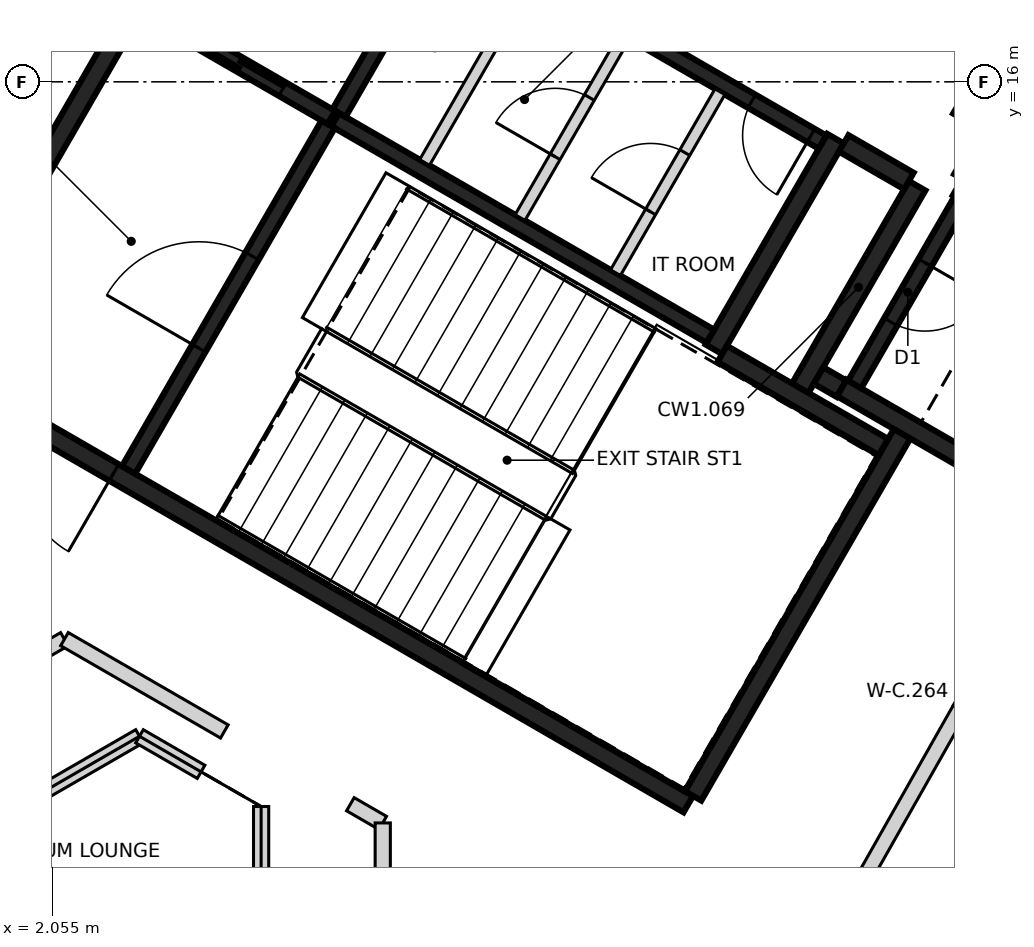
"""IFC4 building model, lengths in metres.
Left out: names, types, materials, properties, quantities, classifications, styles, units other than length and angle.
Written with IfcOpenShell. Run it as: python <this file> out.ifc"""

import sys

from ifc_helpers import new_model, si_unit, direction, frame, frame_2d, origin, place, context, subcontext, project, spatial, rectangle, extrude, element, fill, save


model = new_model("IFC4")
c1 = context("Model", 3, precision=1e-05, world=origin(), true_north=direction((0.0, 1.0)))
c2 = subcontext(c1, "Body", "Model", "MODEL_VIEW")
j1 = project(units=[si_unit("LENGTHUNIT", "METRE"), si_unit("PLANEANGLEUNIT", "RADIAN")], contexts=[c1])
p1 = place(None, origin())
s1 = spatial("IfcSite", under=j1, at=p1, CompositionType="ELEMENT")
p2 = place(p1, origin())
s2 = spatial("IfcBuilding", under=s1, at=p2, CompositionType="ELEMENT")
p3 = place(p2, frame((0.0, 0.0, 150.4)))
s3 = spatial("IfcBuildingStorey", under=s2, at=p3, CompositionType="ELEMENT", Elevation=150.4)
p4 = place(p3, frame((10.42, 6.498, 0.0), z_axis=(0.0, 0.0, 1.0), x_axis=(-0.866021906294, 0.500006057782, 0.0)))
e1 = element("IfcWall", 1, at=p4, inside=s3, PredefinedType="SHEAR", context=c2, shape_type="SweptSolid", body=[
    extrude(rectangle(XDim=11.55, YDim=0.25, at=frame_2d((5.775, 0.0))), origin(), (0.0, 0.0, 1.0), 3.2),
])
p5 = place(p4, frame((10.025, 0.0, 0.0)))
e2 = element("IfcOpeningElement", 2, at=p5, cuts=e1, PredefinedType="OPENING", context=c2, shape_type="SweptSolid", body=[
    extrude(rectangle(XDim=1.2, YDim=2.1, at=frame_2d((0.6, 1.05))), frame((0.0, 0.135, 0.0), z_axis=(0.0, -1.0, 0.0), x_axis=(1.0, 0.0, 0.0)), (0.0, 0.0, 1.0), 0.27),
])
p6 = place(p4, frame((8.725, 0.0, 0.0)))
e3 = element("IfcOpeningElement", 3, at=p6, cuts=e1, PredefinedType="OPENING", context=c2, shape_type="SweptSolid", body=[
    extrude(rectangle(XDim=1.2, YDim=2.1, at=frame_2d((0.6, 1.05))), frame((0.0, 0.135, 0.0), z_axis=(0.0, -1.0, 0.0), x_axis=(1.0, 0.0, 0.0)), (0.0, 0.0, 1.0), 0.27),
])
p7 = place(p3, frame((0.48, 12.381, 0.0), z_axis=(0.0, 0.0, 1.0), x_axis=(0.49999885962, 0.866026062182, 0.0)))
e4 = element("IfcWall", 4, at=p7, inside=s3, PredefinedType="SHEAR", context=c2, shape_type="SweptSolid", body=[
    extrude(rectangle(XDim=5.225, YDim=0.25, at=frame_2d((2.612, 0.0))), origin(), (0.0, 0.0, 1.0), 3.2),
])
p8 = place(p3, frame((13.238, 11.378, 0.0), z_axis=(0.0, 0.0, 1.0), x_axis=(-0.500008851346, -0.866020293397, 0.0)))
e5 = element("IfcWall", 5, at=p8, inside=s3, PredefinedType="SHEAR", context=c2, shape_type="SweptSolid", body=[
    extrude(rectangle(XDim=5.51, YDim=0.25, at=frame_2d((2.755, 0.0))), origin(), (0.0, 0.0, 1.0), 3.2),
])
p9 = place(p3, frame((12.357, 15.252, 0.0), z_axis=(0.0, 0.0, 1.0), x_axis=(-0.500028443584, -0.866008981251, 0.0)))
e6 = element("IfcWall", 6, at=p9, inside=s3, PredefinedType="SHEAR", context=c2, shape_type="SweptSolid", body=[
    extrude(rectangle(XDim=3.2, YDim=0.25, at=frame_2d((1.6, 0.0))), origin(), (0.0, 0.0, 1.0), 3.2),
])
p10 = place(p3, frame((14.918, 10.54, 0.0), z_axis=(0.0, 0.0, 1.0), x_axis=(-0.866063538972, 0.499933942099, 0.0)))
e7 = element("IfcWall", 7, at=p10, inside=s3, PredefinedType="SHEAR", context=c2, shape_type="SweptSolid", body=[
    extrude(rectangle(XDim=2.865, YDim=0.25, at=frame_2d((1.432, 0.0))), origin(), (0.0, 0.0, 1.0), 3.2),
])
p11 = place(p3, frame((13.963, 14.614, 0.0), z_axis=(0.0, 0.0, 1.0), x_axis=(0.866042235819, -0.499970844928, 0.0)))
e8 = element("IfcWall", 8, at=p11, inside=s3, PredefinedType="SHEAR", context=c2, shape_type="SweptSolid", body=[
    extrude(rectangle(XDim=2.865, YDim=0.25, at=frame_2d((1.432, 0.0))), origin(), (0.0, 0.0, 1.0), 3.2),
])
p12 = place(p3, frame((11.888, 11.961, 0.0), z_axis=(0.0, 0.0, 1.0), x_axis=(0.500003324108, 0.866023484601, 0.0)))
e9 = element("IfcWall", 9, at=p12, inside=s3, PredefinedType="SHEAR", context=c2, shape_type="SweptSolid", body=[
    extrude(rectangle(XDim=3.085, YDim=0.25, at=frame_2d((1.542, 0.0))), origin(), (0.0, 0.0, 1.0), 3.2),
])
p13 = place(p3, frame((10.865, 12.418, 0.0), z_axis=(0.0, 0.0, 1.0), x_axis=(0.866026229868, -0.499998569178, 0.0)))
e10 = element("IfcWall", 10, at=p13, inside=s3, PredefinedType="SHEAR", context=c2, shape_type="SweptSolid", body=[
    extrude(rectangle(XDim=2.449, YDim=0.25, at=frame_2d((1.225, 0.0))), origin(), (0.0, 0.0, 1.0), 3.2),
])
p14 = place(p3, frame((14.945, 17.135, 0.0), z_axis=(0.0, 0.0, 1.0), x_axis=(-0.499983108224, -0.866035156036, 0.0)))
e11 = element("IfcWall", 11, at=p14, inside=s3, PredefinedType="SHEAR", context=c2, shape_type="SweptSolid", body=[
    extrude(rectangle(XDim=1.865, YDim=0.25, at=frame_2d((0.932, 0.0))), origin(), (0.0, 0.0, 1.0), 3.2),
])
p15 = place(p14, frame((0.535, 0.0, 0.0)))
e12 = element("IfcOpeningElement", 12, at=p15, cuts=e11, PredefinedType="OPENING", context=c2, shape_type="SweptSolid", body=[
    extrude(rectangle(XDim=1.25, YDim=2.1, at=frame_2d((0.625, 1.05))), frame((0.0, 0.135, 0.0), z_axis=(0.0, -1.0, 0.0), x_axis=(1.0, 0.0, 0.0)), (0.0, 0.0, 1.0), 0.27),
])
p16 = place(p3, frame((13.322, 14.695, 0.0), z_axis=(0.0, 0.0, 1.0), x_axis=(-0.866017078145, 0.500014420154, 0.0)))
e13 = element("IfcWall", 13, at=p16, inside=s3, PredefinedType="SHEAR", context=c2, shape_type="SweptSolid", body=[
    extrude(rectangle(XDim=0.989, YDim=0.25, at=frame_2d((0.495, 0.0))), origin(), (0.0, 0.0, 1.0), 3.2),
])
p17 = place(p3, frame((14.368, 15.315, 0.0), z_axis=(0.0, 0.0, 1.0), x_axis=(-0.499897359611, -0.866084655132, 0.0)))
e14 = element("IfcWall", 14, at=p17, inside=s3, PredefinedType="SHEAR", context=c2, shape_type="SweptSolid", body=[
    extrude(rectangle(XDim=0.685, YDim=0.25, at=frame_2d((0.342, 0.0))), origin(), (0.0, 0.0, 1.0), 3.2),
])
p18 = place(p3, frame((12.433, 11.964, 0.0), z_axis=(0.0, 0.0, 1.0), x_axis=(-0.866055875208, 0.499947218231, 0.0)))
e15 = element("IfcWall", 15, at=p18, inside=s3, PredefinedType="SHEAR", context=c2, shape_type="SweptSolid", body=[
    extrude(rectangle(XDim=0.345, YDim=0.25, at=frame_2d((0.172, 0.0))), origin(), (0.0, 0.0, 1.0), 3.2),
])
p19 = place(p3, frame((5.775, 15.502, 0.0), z_axis=(0.0, 0.0, 1.0), x_axis=(0.866020080793, -0.500009219579, 0.0)))
e16 = element("IfcWall", 16, at=p19, inside=s3, PredefinedType="SHEAR", context=c2, shape_type="SweptSolid", body=[
    extrude(rectangle(XDim=5.699, YDim=0.2, at=frame_2d((2.85, 0.0))), origin(), (0.0, 0.0, 1.0), 3.2),
])
p20 = place(p3, frame((12.185, 15.207, 0.0), z_axis=(0.0, 0.0, 1.0), x_axis=(-0.866020080793, 0.500009219579, 0.0)))
e17 = element("IfcWall", 17, at=p20, inside=s3, PredefinedType="SHEAR", context=c2, shape_type="SweptSolid", body=[
    extrude(rectangle(XDim=5.699, YDim=0.2, at=frame_2d((2.85, 0.0))), origin(), (0.0, 0.0, 1.0), 3.2),
])
p21 = place(p20, frame((0.174, 0.0, 0.0)))
e18 = element("IfcOpeningElement", 18, at=p21, cuts=e17, PredefinedType="OPENING", context=c2, shape_type="SweptSolid", body=[
    extrude(rectangle(XDim=0.9, YDim=2.1, at=frame_2d((0.45, 1.05))), frame((0.0, 0.11, 0.0), z_axis=(0.0, -1.0, 0.0), x_axis=(1.0, 0.0, 0.0)), (0.0, 0.0, 1.0), 0.22),
])
p22 = place(p20, frame((4.599, 0.0, 0.0)))
e19 = element("IfcOpeningElement", 19, at=p22, cuts=e17, PredefinedType="OPENING", context=c2, shape_type="SweptSolid", body=[
    extrude(rectangle(XDim=0.9, YDim=2.1, at=frame_2d((0.45, 1.05))), frame((0.0, 0.11, 0.0), z_axis=(0.0, -1.0, 0.0), x_axis=(1.0, 0.0, 0.0)), (0.0, 0.0, 1.0), 0.22),
])
p23 = place(p3, frame((3.057, 10.895, 0.0), z_axis=(0.0, 0.0, 1.0), x_axis=(0.499989418164, 0.866031513124, 0.0)))
e20 = element("IfcWall", 20, at=p23, inside=s3, PredefinedType="SHEAR", context=c2, shape_type="SweptSolid", body=[
    extrude(rectangle(XDim=5.251, YDim=0.2, at=frame_2d((2.625, 0.0))), origin(), (0.0, 0.0, 1.0), 3.2),
])
p24 = place(p23, frame((1.849, 0.0, 0.0)))
e21 = element("IfcOpeningElement", 21, at=p24, cuts=e20, PredefinedType="OPENING", context=c2, shape_type="SweptSolid", body=[
    extrude(rectangle(XDim=1.4, YDim=2.1, at=frame_2d((0.7, 1.05))), frame((0.0, 0.11, 0.0), z_axis=(0.0, -1.0, 0.0), x_axis=(1.0, 0.0, 0.0)), (0.0, 0.0, 1.0), 0.22),
])
p25 = place(p3, frame((14.008, 14.442, 0.0), z_axis=(0.0, 0.0, 1.0), x_axis=(-0.499986818241, -0.866033014143, 0.0)))
e22 = element("IfcWall", 22, at=p25, inside=s3, PredefinedType="SHEAR", context=c2, shape_type="SweptSolid", body=[
    extrude(rectangle(XDim=2.798, YDim=0.2, at=frame_2d((1.399, 0.0))), origin(), (0.0, 0.0, 1.0), 3.2),
])
p26 = place(p25, frame((0.949, 0.0, 0.0)))
e23 = element("IfcOpeningElement", 23, at=p26, cuts=e22, PredefinedType="OPENING", context=c2, shape_type="SweptSolid", body=[
    extrude(rectangle(XDim=0.9, YDim=2.1, at=frame_2d((0.45, 1.05))), frame((0.0, 0.11, 0.0), z_axis=(0.0, -1.0, 0.0), x_axis=(1.0, 0.0, 0.0)), (0.0, 0.0, 1.0), 0.22),
])
p27 = place(p3, frame((7.199, 17.97, 0.0), z_axis=(0.0, 0.0, 1.0), x_axis=(-0.499968400327, -0.866043647095, 0.0)))
e24 = element("IfcWall", 24, at=p27, inside=s3, PredefinedType="SHEAR", context=c2, shape_type="SweptSolid", body=[
    extrude(rectangle(XDim=2.75, YDim=0.2, at=frame_2d((1.375, 0.0))), origin(), (0.0, 0.0, 1.0), 3.2),
])
p28 = place(p3, frame((5.725, 15.531, 0.0), z_axis=(0.0, 0.0, 1.0), x_axis=(-0.866037306777, 0.499979382845, 0.0)))
e25 = element("IfcWall", 25, at=p28, inside=s3, PredefinedType="SHEAR", context=c2, shape_type="SweptSolid", body=[
    extrude(rectangle(XDim=2.742, YDim=0.2, at=frame_2d((1.371, 0.0))), origin(), (0.0, 0.0, 1.0), 3.2),
])
p29 = place(p28, frame((0.743, 0.0, 0.0)))
e26 = element("IfcOpeningElement", 26, at=p29, cuts=e25, PredefinedType="OPENING", context=c2, shape_type="SweptSolid", body=[
    extrude(rectangle(XDim=1.3, YDim=2.1, at=frame_2d((0.65, 1.05))), frame((0.0, 0.11, 0.0), z_axis=(0.0, -1.0, 0.0), x_axis=(1.0, 0.0, 0.0)), (0.0, 0.0, 1.0), 0.22),
])
p30 = place(p3, frame((9.462, 13.489, 0.0), z_axis=(0.0, 0.0, 1.0), x_axis=(0.50002746344, 0.86600954718, 0.0)))
e27 = element("IfcWall", 27, at=p30, inside=s3, PredefinedType="PARTITIONING", context=c2, shape_type="SweptSolid", body=[
    extrude(rectangle(XDim=2.748, YDim=0.15, at=frame_2d((1.374, 0.0))), origin(), (0.0, 0.0, 1.0), 3.2),
])
p31 = place(p30, frame((0.924, 0.0, 0.0)))
e28 = element("IfcOpeningElement", 28, at=p31, cuts=e27, PredefinedType="OPENING", context=c2, shape_type="SweptSolid", body=[
    extrude(rectangle(XDim=0.9, YDim=2.1, at=frame_2d((0.45, 1.05))), frame((0.0, 0.085, 0.0), z_axis=(0.0, -1.0, 0.0), x_axis=(1.0, 0.0, 0.0)), (0.0, 0.0, 1.0), 0.17),
])
p32 = place(p3, frame((8.207, 14.214, 0.0), z_axis=(0.0, 0.0, 1.0), x_axis=(0.499922376475, 0.866070215109, 0.0)))
e29 = element("IfcWall", 29, at=p32, inside=s3, PredefinedType="PARTITIONING", context=c2, shape_type="SweptSolid", body=[
    extrude(rectangle(XDim=2.749, YDim=0.15, at=frame_2d((1.374, 0.0))), origin(), (0.0, 0.0, 1.0), 3.2),
])
p33 = place(p32, frame((0.924, 0.0, 0.0)))
e30 = element("IfcOpeningElement", 30, at=p33, cuts=e29, PredefinedType="OPENING", context=c2, shape_type="SweptSolid", body=[
    extrude(rectangle(XDim=0.9, YDim=2.1, at=frame_2d((0.45, 1.05))), frame((0.0, 0.085, 0.0), z_axis=(0.0, -1.0, 0.0), x_axis=(1.0, 0.0, 0.0)), (0.0, 0.0, 1.0), 0.17),
])
p34 = place(p3, frame((6.951, 14.939, 0.0), z_axis=(0.0, 0.0, 1.0), x_axis=(0.50002746344, 0.86600954718, 0.0)))
e31 = element("IfcWall", 31, at=p34, inside=s3, PredefinedType="PARTITIONING", context=c2, shape_type="SweptSolid", body=[
    extrude(rectangle(XDim=2.748, YDim=0.15, at=frame_2d((1.374, 0.0))), origin(), (0.0, 0.0, 1.0), 3.2),
])
p35 = place(p3, frame((-8.612, 2.418, 0.0), z_axis=(0.0, 0.0, 1.0), x_axis=(0.866019033094, 0.500011034197, 0.0)))
e32 = element("IfcWall", 32, at=p35, inside=s3, PredefinedType="PARTITIONING", context=c2, shape_type="SweptSolid", body=[
    extrude(rectangle(XDim=12.498, YDim=0.2, at=frame_2d((6.249, 0.0))), origin(), (0.0, 0.0, 1.0), 3.2),
])
p36 = place(p35, frame((9.346, 0.0, 0.0)))
e33 = element("IfcOpeningElement", 33, at=p36, cuts=e32, PredefinedType="OPENING", context=c2, shape_type="SweptSolid", body=[
    extrude(rectangle(XDim=0.9, YDim=2.1, at=frame_2d((0.45, 1.05))), frame((0.0, 0.11, 0.0), z_axis=(0.0, -1.0, 0.0), x_axis=(1.0, 0.0, 0.0)), (0.0, 0.0, 1.0), 0.22),
])
p37 = place(p35, frame((3.109, 0.0, 0.0)))
e34 = element("IfcOpeningElement", 34, at=p37, cuts=e32, PredefinedType="OPENING", context=c2, shape_type="SweptSolid", body=[
    extrude(rectangle(XDim=0.9, YDim=2.1, at=frame_2d((0.45, 1.05))), frame((0.0, 0.11, 0.0), z_axis=(0.0, -1.0, 0.0), x_axis=(1.0, 0.0, 0.0)), (0.0, 0.0, 1.0), 0.22),
])
p38 = place(p3, frame((2.213, 8.668, 0.0), z_axis=(0.0, 0.0, 1.0), x_axis=(0.866001461921, -0.500041466232, 0.0)))
e35 = element("IfcWall", 35, at=p38, inside=s3, PredefinedType="PARTITIONING", context=c2, shape_type="SweptSolid", body=[
    extrude(rectangle(XDim=2.429, YDim=0.2, at=frame_2d((1.214, 0.0))), origin(), (0.0, 0.0, 1.0), 2.3),
])
p39 = place(p3, frame((5.974, 6.496, 0.0), z_axis=(0.0, 0.0, 1.0), x_axis=(0.865788603161, -0.500409926597, 0.0)))
e36 = element("IfcWall", 36, at=p39, inside=s3, PredefinedType="PARTITIONING", context=c2, shape_type="SweptSolid", body=[
    extrude(rectangle(XDim=0.492, YDim=0.2, at=frame_2d((0.246, 0.0))), origin(), (0.0, 0.0, 1.0), 3.2),
])
p40 = place(p3, frame((6.4, -6.25, 0.0), z_axis=(0.0, 0.0, 1.0), x_axis=(0.0, 1.0, 0.0)))
e37 = element("IfcWall", 37, at=p40, inside=s3, PredefinedType="PARTITIONING", context=c2, shape_type="SweptSolid", body=[
    extrude(rectangle(XDim=12.5, YDim=0.2, at=frame_2d((6.25, 0.0))), origin(), (0.0, 0.0, 1.0), 3.2),
])
p41 = place(p40, frame((2.077, 0.0, 0.0)))
e38 = element("IfcOpeningElement", 38, at=p41, cuts=e37, PredefinedType="OPENING", context=c2, shape_type="SweptSolid", body=[
    extrude(rectangle(XDim=0.9, YDim=2.1, at=frame_2d((0.45, 1.05))), frame((0.0, 0.11, 0.0), z_axis=(0.0, -1.0, 0.0), x_axis=(1.0, 0.0, 0.0)), (0.0, 0.0, 1.0), 0.22),
])
p42 = place(p40, frame((8.315, 0.0, 0.0)))
e39 = element("IfcOpeningElement", 39, at=p42, cuts=e37, PredefinedType="OPENING", context=c2, shape_type="SweptSolid", body=[
    extrude(rectangle(XDim=0.9, YDim=2.1, at=frame_2d((0.45, 1.05))), frame((0.0, 0.11, 0.0), z_axis=(0.0, -1.0, 0.0), x_axis=(1.0, 0.0, 0.0)), (0.0, 0.0, 1.0), 0.22),
])
p43 = place(p3, frame((12.433, 4.992, 0.0), z_axis=(0.0, 0.0, 1.0), x_axis=(0.492572049538, 0.870271667937, 0.0)))
e40 = element("IfcWall", 40, at=p43, inside=s3, PredefinedType="PARTITIONING", context=c2, shape_type="SweptSolid", body=[
    extrude(rectangle(XDim=6.265, YDim=0.2, at=frame_2d((3.133, 0.0))), origin(), (0.0, 0.0, 1.0), 3.2),
])
p44 = place(p3, frame((-8.0, 0.925, 0.0), z_axis=(0.0, 0.0, 1.0), x_axis=(0.866075250037, 0.499913653818, 0.0)))
e41 = element("IfcWall", 41, at=p44, inside=s3, PredefinedType="PARTITIONING", context=c2, shape_type="SweptSolid", body=[
    extrude(rectangle(XDim=12.932, YDim=0.2, at=frame_2d((6.466, 0.0))), origin(), (0.0, 0.0, 1.0), 2.3),
])
p45 = place(p3, frame((3.2, 7.39, 0.0), z_axis=(0.0, 0.0, 1.0), x_axis=(0.865985641702, -0.500068863623, 0.0)))
e42 = element("IfcWall", 42, at=p45, inside=s3, PredefinedType="PARTITIONING", context=c2, shape_type="SweptSolid", body=[
    extrude(rectangle(XDim=0.935, YDim=0.2, at=frame_2d((0.468, 0.0))), origin(), (0.0, 0.0, 1.0), 2.3),
])
p46 = place(p3, frame((4.8, -6.466, 0.0), z_axis=(0.0, 0.0, 1.0), x_axis=(0.0, 1.0, 0.0)))
e43 = element("IfcWall", 43, at=p46, inside=s3, PredefinedType="PARTITIONING", context=c2, shape_type="SweptSolid", body=[
    extrude(rectangle(XDim=12.932, YDim=0.2, at=frame_2d((6.466, 0.0))), origin(), (0.0, 0.0, 1.0), 2.3),
])
p47 = place(p29, origin())
e44 = element("IfcDoor", 44, at=p47, inside=s3, OperationType="SLIDING_TO_LEFT", PredefinedType="DOOR", context=c2, shape_type="SweptSolid", body=[
    extrude(rectangle(XDim=1.3, YDim=2.1, at=frame_2d((0.65, 1.05))), frame((0.0, 0.025, 0.0), z_axis=(0.0, -1.0, 0.0), x_axis=(1.0, 0.0, 0.0)), (0.0, 0.0, 1.0), 0.05),
])
fill(e26, e44)
p48 = place(p6, origin())
e45 = element("IfcDoor", 45, at=p48, inside=s3, OperationType="SINGLE_SWING_RIGHT", PredefinedType="DOOR", context=c2, shape_type="SweptSolid", body=[
    extrude(rectangle(XDim=1.2, YDim=2.1, at=frame_2d((0.6, 1.05))), frame((0.0, 0.025, 0.0), z_axis=(0.0, -1.0, 0.0), x_axis=(1.0, 0.0, 0.0)), (0.0, 0.0, 1.0), 0.05),
])
fill(e3, e45)
p49 = place(p24, origin())
e46 = element("IfcDoor", 46, at=p49, inside=s3, OperationType="SINGLE_SWING_LEFT", PredefinedType="DOOR", context=c2, shape_type="SweptSolid", body=[
    extrude(rectangle(XDim=1.4, YDim=2.1, at=frame_2d((0.7, 1.05))), frame((0.0, 0.025, 0.0), z_axis=(0.0, -1.0, 0.0), x_axis=(1.0, 0.0, 0.0)), (0.0, 0.0, 1.0), 0.05),
])
fill(e21, e46)
p50 = place(p21, origin())
e47 = element("IfcDoor", 47, at=p50, inside=s3, OperationType="SINGLE_SWING_RIGHT", PredefinedType="DOOR", context=c2, shape_type="SweptSolid", body=[
    extrude(rectangle(XDim=0.9, YDim=2.1, at=frame_2d((0.45, 1.05))), frame((0.0, 0.025, 0.0), z_axis=(0.0, -1.0, 0.0), x_axis=(1.0, 0.0, 0.0)), (0.0, 0.0, 1.0), 0.05),
])
fill(e18, e47)
p51 = place(p31, origin())
e48 = element("IfcDoor", 48, at=p51, inside=s3, OperationType="SINGLE_SWING_LEFT", PredefinedType="DOOR", context=c2, shape_type="SweptSolid", body=[
    extrude(rectangle(XDim=0.9, YDim=2.1, at=frame_2d((0.45, 1.05))), frame((0.0, 0.025, 0.0), z_axis=(0.0, -1.0, 0.0), x_axis=(1.0, 0.0, 0.0)), (0.0, 0.0, 1.0), 0.05),
])
fill(e28, e48)
p52 = place(p33, origin())
e49 = element("IfcDoor", 49, at=p52, inside=s3, OperationType="SINGLE_SWING_RIGHT", PredefinedType="DOOR", context=c2, shape_type="SweptSolid", body=[
    extrude(rectangle(XDim=0.9, YDim=2.1, at=frame_2d((0.45, 1.05))), frame((0.0, 0.025, 0.0), z_axis=(0.0, -1.0, 0.0), x_axis=(1.0, 0.0, 0.0)), (0.0, 0.0, 1.0), 0.05),
])
fill(e30, e49)
p53 = place(p26, origin())
e50 = element("IfcDoor", 50, at=p53, inside=s3, OperationType="SINGLE_SWING_RIGHT", PredefinedType="DOOR", context=c2, shape_type="SweptSolid", body=[
    extrude(rectangle(XDim=0.9, YDim=2.1, at=frame_2d((0.45, 1.05))), frame((0.0, 0.025, 0.0), z_axis=(0.0, -1.0, 0.0), x_axis=(1.0, 0.0, 0.0)), (0.0, 0.0, 1.0), 0.05),
])
fill(e23, e50)
save(model, sys.argv[1])
